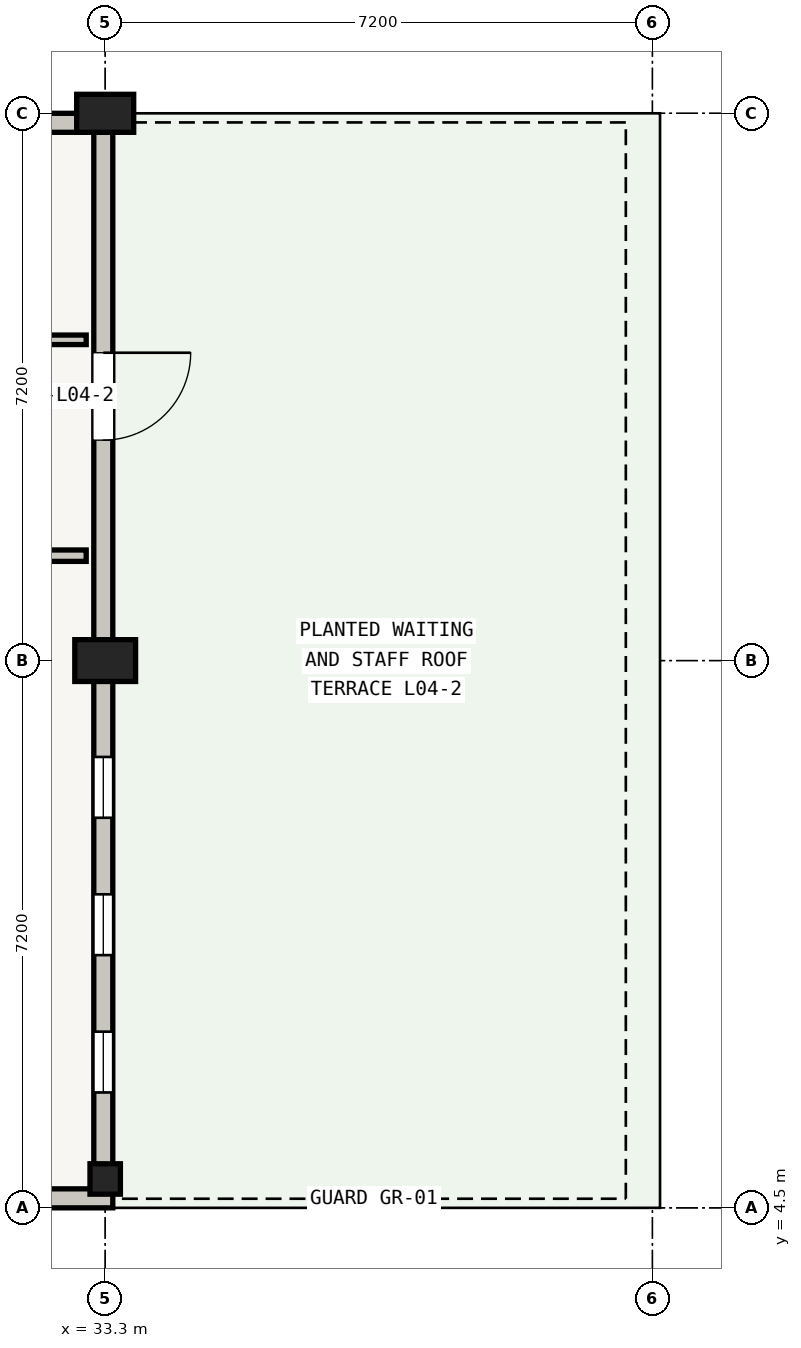
"""IFC4 building model, lengths in metres.
Left out: names, types, materials, properties, quantities, classifications, styles, units other than length and angle.
Written with IfcOpenShell. Run it as: python <this file> out.ifc"""

import sys

from ifc_helpers import new_model, si_unit, direction, frame, frame_2d, origin, origin_2d, place, context, subcontext, project, spatial, rectangle, extrude, element, fill, save


model = new_model("IFC4")
c1 = context("Model", 3, precision=1e-05, world=origin(), true_north=direction((0.0, 1.0)))
c2 = subcontext(c1, "Body", "Model", "MODEL_VIEW")
j1 = project(units=[si_unit("LENGTHUNIT", "METRE"), si_unit("PLANEANGLEUNIT", "RADIAN")], contexts=[c1])
p1 = place(None, origin())
s1 = spatial("IfcSite", under=j1, at=p1, CompositionType="ELEMENT")
p2 = place(p1, origin())
s2 = spatial("IfcBuilding", under=s1, at=p2, CompositionType="ELEMENT")
p3 = place(p2, frame((0.0, 0.0, 17.1)))
s3 = spatial("IfcBuildingStorey", under=s2, at=p3, CompositionType="ELEMENT", Elevation=17.1)
p4 = place(p3, frame((33.3, 4.88, 0.0), z_axis=(0.0, 0.0, 1.0), x_axis=(1.0, 0.0, 0.0)))
e1 = element("IfcColumn", 1, at=p4, inside=s3, PredefinedType="COLUMN", context=c2, shape_type="SweptSolid", body=[
    extrude(rectangle(XDim=0.4, YDim=0.4, at=origin_2d()), origin(), (0.0, 0.0, 1.0), 3.77),
])
p5 = place(p3, frame((33.3, 11.7, 0.0), z_axis=(0.0, 0.0, 1.0), x_axis=(1.0, 0.0, 0.0)))
e2 = element("IfcColumn", 2, at=p5, inside=s3, PredefinedType="COLUMN", context=c2, shape_type="SweptSolid", body=[
    extrude(rectangle(XDim=0.8, YDim=0.55, at=origin_2d()), origin(), (0.0, 0.0, 1.0), 3.77),
])
p6 = place(p3, frame((33.3, 18.9, 0.0), z_axis=(0.0, 0.0, 1.0), x_axis=(1.0, 0.0, 0.0)))
e3 = element("IfcColumn", 3, at=p6, inside=s3, PredefinedType="COLUMN", context=c2, shape_type="SweptSolid", body=[
    extrude(rectangle(XDim=0.75, YDim=0.5, at=origin_2d()), origin(), (0.0, 0.0, 1.0), 3.77),
])
p7 = place(p3, frame((26.1, 18.775, 0.0), z_axis=(0.0, 0.0, 1.0), x_axis=(1.0, 0.0, 0.0)))
e4 = element("IfcWall", 4, at=p7, inside=s3, PredefinedType="STANDARD", context=c2, shape_type="SweptSolid", body=[
    extrude(rectangle(XDim=7.3, YDim=0.25, at=frame_2d((3.65, 0.0))), origin(), (0.0, 0.0, 1.0), 3.275),
])
p8 = place(p7, frame((1.412, 0.0, 0.55)))
e5 = element("IfcOpeningElement", 5, at=p8, cuts=e4, PredefinedType="OPENING", context=c2, shape_type="SweptSolid", body=[
    extrude(rectangle(XDim=0.68, YDim=2.22, at=frame_2d((0.34, 1.11))), frame((0.0, 0.125, 0.0), z_axis=(0.0, -1.0, 0.0), x_axis=(1.0, 0.0, 0.0)), (0.0, 0.0, 1.0), 0.25),
])
p9 = place(p7, frame((3.31, 0.0, 0.55)))
e6 = element("IfcOpeningElement", 6, at=p9, cuts=e4, PredefinedType="OPENING", context=c2, shape_type="SweptSolid", body=[
    extrude(rectangle(XDim=0.68, YDim=2.22, at=frame_2d((0.34, 1.11))), frame((0.0, 0.125, 0.0), z_axis=(0.0, -1.0, 0.0), x_axis=(1.0, 0.0, 0.0)), (0.0, 0.0, 1.0), 0.25),
])
p10 = place(p7, frame((5.208, 0.0, 0.55)))
e7 = element("IfcOpeningElement", 7, at=p10, cuts=e4, PredefinedType="OPENING", context=c2, shape_type="SweptSolid", body=[
    extrude(rectangle(XDim=0.68, YDim=2.22, at=frame_2d((0.34, 1.11))), frame((0.0, 0.125, 0.0), z_axis=(0.0, -1.0, 0.0), x_axis=(1.0, 0.0, 0.0)), (0.0, 0.0, 1.0), 0.25),
])
p11 = place(p3, frame((33.275, 18.65, 0.0), z_axis=(0.0, 0.0, 1.0), x_axis=(0.0, -1.0, 0.0)))
e8 = element("IfcWall", 8, at=p11, inside=s3, PredefinedType="STANDARD", context=c2, shape_type="SweptSolid", body=[
    extrude(rectangle(XDim=6.95, YDim=0.25, at=frame_2d((3.475, 0.0))), origin(), (0.0, 0.0, 1.0), 3.305),
])
p12 = place(p11, frame((2.9, 0.0, 0.19)))
e9 = element("IfcOpeningElement", 9, at=p12, cuts=e8, PredefinedType="OPENING", context=c2, shape_type="SweptSolid", body=[
    extrude(rectangle(XDim=1.15, YDim=2.02, at=frame_2d((0.575, 1.01))), frame((0.0, 0.125, 0.0), z_axis=(0.0, -1.0, 0.0), x_axis=(1.0, 0.0, 0.0)), (0.0, 0.0, 1.0), 0.25),
])
p13 = place(p3, frame((33.275, 11.7, 0.0), z_axis=(0.0, 0.0, 1.0), x_axis=(0.0, -1.0, 0.0)))
e10 = element("IfcWall", 10, at=p13, inside=s3, PredefinedType="STANDARD", context=c2, shape_type="SweptSolid", body=[
    extrude(rectangle(XDim=6.95, YDim=0.25, at=frame_2d((3.475, 0.0))), origin(), (0.0, 0.0, 1.0), 3.255),
])
p14 = place(p13, frame((1.268, 0.0, 0.55)))
e11 = element("IfcOpeningElement", 11, at=p14, cuts=e10, PredefinedType="OPENING", context=c2, shape_type="SweptSolid", body=[
    extrude(rectangle(XDim=0.8, YDim=2.16, at=frame_2d((0.4, 1.08))), frame((0.0, 0.125, 0.0), z_axis=(0.0, -1.0, 0.0), x_axis=(1.0, 0.0, 0.0)), (0.0, 0.0, 1.0), 0.25),
])
p15 = place(p13, frame((3.075, 0.0, 0.55)))
e12 = element("IfcOpeningElement", 12, at=p15, cuts=e10, PredefinedType="OPENING", context=c2, shape_type="SweptSolid", body=[
    extrude(rectangle(XDim=0.8, YDim=2.16, at=frame_2d((0.4, 1.08))), frame((0.0, 0.125, 0.0), z_axis=(0.0, -1.0, 0.0), x_axis=(1.0, 0.0, 0.0)), (0.0, 0.0, 1.0), 0.25),
])
p16 = place(p13, frame((4.882, 0.0, 0.55)))
e13 = element("IfcOpeningElement", 13, at=p16, cuts=e10, PredefinedType="OPENING", context=c2, shape_type="SweptSolid", body=[
    extrude(rectangle(XDim=0.8, YDim=2.16, at=frame_2d((0.4, 1.08))), frame((0.0, 0.125, 0.0), z_axis=(0.0, -1.0, 0.0), x_axis=(1.0, 0.0, 0.0)), (0.0, 0.0, 1.0), 0.25),
])
p17 = place(p3, frame((33.4, 4.625, 0.0), z_axis=(0.0, 0.0, 1.0), x_axis=(-1.0, 0.0, 0.0)))
e14 = element("IfcWall", 14, at=p17, inside=s3, PredefinedType="STANDARD", context=c2, shape_type="SweptSolid", body=[
    extrude(rectangle(XDim=7.3, YDim=0.25, at=frame_2d((3.65, 0.0))), origin(), (0.0, 0.0, 1.0), 2.805),
])
p18 = place(p17, frame((1.352, 0.0, 0.6)))
e15 = element("IfcOpeningElement", 15, at=p18, cuts=e14, PredefinedType="OPENING", context=c2, shape_type="SweptSolid", body=[
    extrude(rectangle(XDim=0.8, YDim=1.8, at=frame_2d((0.4, 0.9))), frame((0.0, 0.125, 0.0), z_axis=(0.0, -1.0, 0.0), x_axis=(1.0, 0.0, 0.0)), (0.0, 0.0, 1.0), 0.25),
])
p19 = place(p17, frame((3.25, 0.0, 0.6)))
e16 = element("IfcOpeningElement", 16, at=p19, cuts=e14, PredefinedType="OPENING", context=c2, shape_type="SweptSolid", body=[
    extrude(rectangle(XDim=0.8, YDim=1.8, at=frame_2d((0.4, 0.9))), frame((0.0, 0.125, 0.0), z_axis=(0.0, -1.0, 0.0), x_axis=(1.0, 0.0, 0.0)), (0.0, 0.0, 1.0), 0.25),
])
p20 = place(p17, frame((5.148, 0.0, 0.6)))
e17 = element("IfcOpeningElement", 17, at=p20, cuts=e14, PredefinedType="OPENING", context=c2, shape_type="SweptSolid", body=[
    extrude(rectangle(XDim=0.8, YDim=1.8, at=frame_2d((0.4, 0.9))), frame((0.0, 0.125, 0.0), z_axis=(0.0, -1.0, 0.0), x_axis=(1.0, 0.0, 0.0)), (0.0, 0.0, 1.0), 0.25),
])
p21 = place(p3, frame((16.67, 13.08, 0.0), z_axis=(0.0, 0.0, 1.0), x_axis=(1.0, 0.0, 0.0)))
e18 = element("IfcWall", 18, at=p21, inside=s3, PredefinedType="PARTITIONING", context=c2, shape_type="SweptSolid", body=[
    extrude(rectangle(XDim=16.38, YDim=0.15, at=frame_2d((8.19, 0.0))), origin(), (0.0, 0.0, 1.0), 2.79),
])
p22 = place(p21, frame((7.69, 0.0, 0.0)))
e19 = element("IfcOpeningElement", 19, at=p22, cuts=e18, PredefinedType="OPENING", context=c2, shape_type="SweptSolid", body=[
    extrude(rectangle(XDim=1.0, YDim=2.05, at=frame_2d((0.5, 1.025))), frame((0.0, 0.075, 0.0), z_axis=(0.0, -1.0, 0.0), x_axis=(1.0, 0.0, 0.0)), (0.0, 0.0, 1.0), 0.15),
])
p23 = place(p3, frame((33.05, 15.92, 0.0), z_axis=(0.0, 0.0, 1.0), x_axis=(-1.0, 0.0, 0.0)))
e20 = element("IfcWall", 20, at=p23, inside=s3, PredefinedType="PARTITIONING", context=c2, shape_type="SweptSolid", body=[
    extrude(rectangle(XDim=16.38, YDim=0.125, at=frame_2d((8.19, 0.0))), origin(), (0.0, 0.0, 1.0), 2.79),
])
p24 = place(p12, origin())
e21 = element("IfcDoor", 21, at=p24, inside=s3, OperationType="SINGLE_SWING_LEFT", PredefinedType="DOOR", context=c2, shape_type="SweptSolid", body=[
    extrude(rectangle(XDim=1.15, YDim=2.02, at=frame_2d((0.575, 1.01))), frame((0.0, 0.025, 0.0), z_axis=(0.0, -1.0, 0.0), x_axis=(1.0, 0.0, 0.0)), (0.0, 0.0, 1.0), 0.05),
])
fill(e9, e21)
p25 = place(p14, origin())
e22 = element("IfcWindow", 22, at=p25, inside=s3, PartitioningType="SINGLE_PANEL", PredefinedType="WINDOW", context=c2, shape_type="SweptSolid", body=[
    extrude(rectangle(XDim=0.8, YDim=2.16, at=frame_2d((0.4, 1.08))), frame((0.0, 0.03, 0.0), z_axis=(0.0, -1.0, 0.0), x_axis=(1.0, 0.0, 0.0)), (0.0, 0.0, 1.0), 0.06),
])
fill(e11, e22)
p26 = place(p15, origin())
e23 = element("IfcWindow", 23, at=p26, inside=s3, PartitioningType="SINGLE_PANEL", PredefinedType="WINDOW", context=c2, shape_type="SweptSolid", body=[
    extrude(rectangle(XDim=0.8, YDim=2.16, at=frame_2d((0.4, 1.08))), frame((0.0, 0.03, 0.0), z_axis=(0.0, -1.0, 0.0), x_axis=(1.0, 0.0, 0.0)), (0.0, 0.0, 1.0), 0.06),
])
fill(e12, e23)
p27 = place(p16, origin())
e24 = element("IfcWindow", 24, at=p27, inside=s3, PartitioningType="SINGLE_PANEL", PredefinedType="WINDOW", context=c2, shape_type="SweptSolid", body=[
    extrude(rectangle(XDim=0.8, YDim=2.16, at=frame_2d((0.4, 1.08))), frame((0.0, 0.03, 0.0), z_axis=(0.0, -1.0, 0.0), x_axis=(1.0, 0.0, 0.0)), (0.0, 0.0, 1.0), 0.06),
])
fill(e13, e24)
save(model, sys.argv[1])
